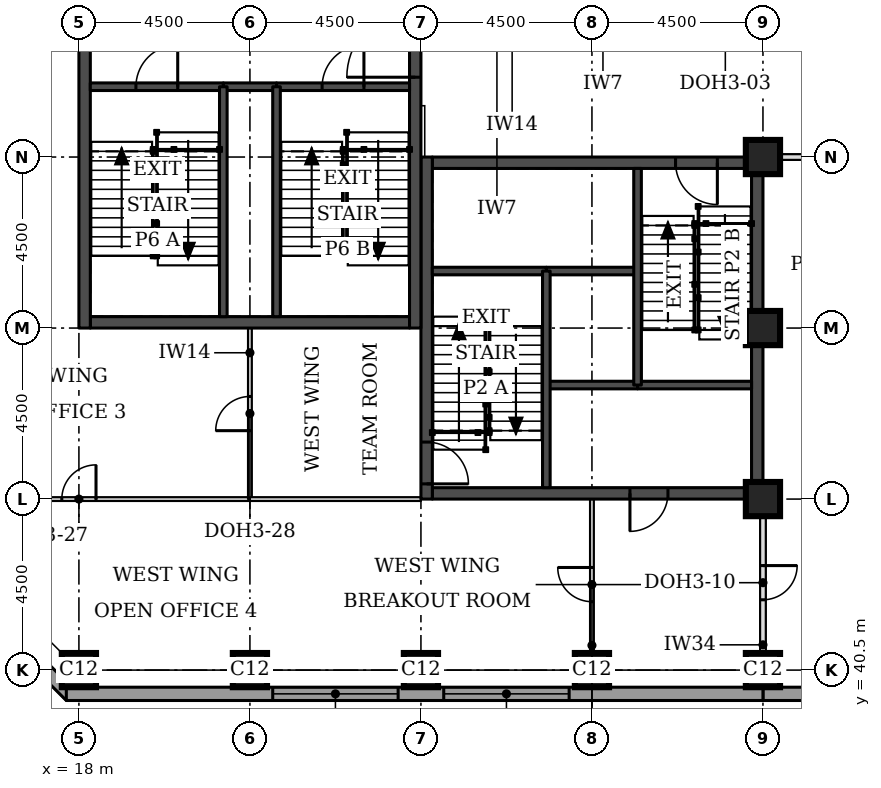
"""IFC4 building model, lengths in metres.
Left out: names, types, materials, properties, quantities, classifications, styles, units other than length and angle.
Written with IfcOpenShell. Run it as: python <this file> out.ifc"""

import sys

from ifc_helpers import new_model, si_unit, direction, frame, frame_2d, origin, origin_2d, place, context, subcontext, project, spatial, rectangle, extrude, element, fill, save


model = new_model("IFC4")
c1 = context("Model", 3, precision=1e-05, world=origin(), true_north=direction((0.0, 1.0)))
c2 = subcontext(c1, "Body", "Model", "MODEL_VIEW")
j1 = project(units=[si_unit("LENGTHUNIT", "METRE"), si_unit("PLANEANGLEUNIT", "RADIAN")], contexts=[c1])
p1 = place(None, origin())
s1 = spatial("IfcSite", under=j1, at=p1, CompositionType="ELEMENT")
p2 = place(p1, origin())
s2 = spatial("IfcBuilding", under=s1, at=p2, CompositionType="ELEMENT")
p3 = place(p2, frame((0.0, 0.0, 166.2)))
s3 = spatial("IfcBuildingStorey", under=s2, at=p3, CompositionType="ELEMENT", Elevation=166.2)
for number, where, z_axis, x_axis in (
    (1, (18.0, 40.5, 0.0), (0.0, 0.0, 1.0), (1.0, 0.0, 0.0)),
    (2, (22.5, 40.5, 0.0), (0.0, 0.0, 1.0), (1.0, 0.0, 0.0)),
    (3, (27.0, 40.5, 0.0), (0.0, 0.0, 1.0), (1.0, 0.0, 0.0)),
    (4, (31.5, 40.5, 0.0), (0.0, 0.0, 1.0), (1.0, 0.0, 0.0)),
    (5, (36.0, 40.5, 0.0), (0.0, 0.0, 1.0), (1.0, 0.0, 0.0)),
    (6, (36.0, 45.0, 0.0), (0.0, 0.0, 1.0), (1.0, 0.0, 0.0)),
    (7, (36.0, 49.5, 0.0), (0.0, 0.0, 1.0), (1.0, 0.0, 0.0)),
    (8, (36.0, 54.0, 0.0), (0.0, 0.0, 1.0), (1.0, 0.0, 0.0)),
):
    element("IfcColumn", number, at=place(p3, frame(where, z_axis=z_axis, x_axis=x_axis)), inside=s3, PredefinedType="COLUMN", context=c2, shape_type="SweptSolid", body=[
        extrude(rectangle(XDim=0.9, YDim=0.9, at=origin_2d()), origin(), (0.0, 0.0, 1.0), 3.7),
    ])
p4 = place(p3, frame((27.3, 45.15, 0.0), z_axis=(0.0, 0.0, 1.0), x_axis=(1.0, 0.0, 0.0)))
e9 = element("IfcWall", 9, at=p4, inside=s3, PredefinedType="SHEAR", context=c2, shape_type="SweptSolid", body=[
    extrude(rectangle(XDim=8.4, YDim=0.3, at=frame_2d((4.2, 0.0))), origin(), (0.0, 0.0, 1.0), 3.7),
])
p5 = place(p4, frame((5.2, 0.0, 0.0)))
e10 = element("IfcOpeningElement", 10, at=p5, cuts=e9, PredefinedType="OPENING", context=c2, shape_type="SweptSolid", body=[
    extrude(rectangle(XDim=1.0, YDim=2.1, at=frame_2d((0.5, 1.05))), frame((0.0, 0.16, 0.0), z_axis=(0.0, -1.0, 0.0), x_axis=(1.0, 0.0, 0.0)), (0.0, 0.0, 1.0), 0.32),
])
p6 = place(p3, frame((27.3, 53.85, 0.0), z_axis=(0.0, 0.0, 1.0), x_axis=(1.0, 0.0, 0.0)))
e11 = element("IfcWall", 11, at=p6, inside=s3, PredefinedType="SHEAR", context=c2, shape_type="SweptSolid", body=[
    extrude(rectangle(XDim=8.4, YDim=0.3, at=frame_2d((4.2, 0.0))), origin(), (0.0, 0.0, 1.0), 3.7),
])
p7 = place(p6, frame((6.4, 0.0, 0.0)))
e12 = element("IfcOpeningElement", 12, at=p7, cuts=e11, PredefinedType="OPENING", context=c2, shape_type="SweptSolid", body=[
    extrude(rectangle(XDim=1.1, YDim=2.1, at=frame_2d((0.55, 1.05))), frame((0.0, 0.16, 0.0), z_axis=(0.0, -1.0, 0.0), x_axis=(1.0, 0.0, 0.0)), (0.0, 0.0, 1.0), 0.32),
])
p8 = place(p3, frame((27.15, 45.0, 0.0), z_axis=(0.0, 0.0, 1.0), x_axis=(0.0, 1.0, 0.0)))
e13 = element("IfcWall", 13, at=p8, inside=s3, PredefinedType="SHEAR", context=c2, shape_type="SweptSolid", body=[
    extrude(rectangle(XDim=9.0, YDim=0.3, at=frame_2d((4.5, 0.0))), origin(), (0.0, 0.0, 1.0), 3.7),
])
p9 = place(p8, frame((0.4, 0.0, 0.0)))
e14 = element("IfcOpeningElement", 14, at=p9, cuts=e13, PredefinedType="OPENING", context=c2, shape_type="SweptSolid", body=[
    extrude(rectangle(XDim=1.1, YDim=2.1, at=frame_2d((0.55, 1.05))), frame((0.0, 0.16, 0.0), z_axis=(0.0, -1.0, 0.0), x_axis=(1.0, 0.0, 0.0)), (0.0, 0.0, 1.0), 0.32),
])
p10 = place(p3, frame((35.85, 45.0, 0.0), z_axis=(0.0, 0.0, 1.0), x_axis=(0.0, 1.0, 0.0)))
e15 = element("IfcWall", 15, at=p10, inside=s3, PredefinedType="SHEAR", context=c2, shape_type="SweptSolid", body=[
    extrude(rectangle(XDim=9.0, YDim=0.3, at=frame_2d((4.5, 0.0))), origin(), (0.0, 0.0, 1.0), 3.7),
])
p11 = place(p3, frame((18.3, 49.65, 0.0), z_axis=(0.0, 0.0, 1.0), x_axis=(1.0, 0.0, 0.0)))
e16 = element("IfcWall", 16, at=p11, inside=s3, PredefinedType="SHEAR", context=c2, shape_type="SweptSolid", body=[
    extrude(rectangle(XDim=8.4, YDim=0.3, at=frame_2d((4.2, 0.0))), origin(), (0.0, 0.0, 1.0), 3.7),
])
p12 = place(p3, frame((18.15, 49.5, 0.0), z_axis=(0.0, 0.0, 1.0), x_axis=(0.0, 1.0, 0.0)))
e17 = element("IfcWall", 17, at=p12, inside=s3, PredefinedType="SHEAR", context=c2, shape_type="SweptSolid", body=[
    extrude(rectangle(XDim=9.0, YDim=0.3, at=frame_2d((4.5, 0.0))), origin(), (0.0, 0.0, 1.0), 3.7),
])
p13 = place(p3, frame((26.85, 49.5, 0.0), z_axis=(0.0, 0.0, 1.0), x_axis=(0.0, 1.0, 0.0)))
e18 = element("IfcWall", 18, at=p13, inside=s3, PredefinedType="SHEAR", context=c2, shape_type="SweptSolid", body=[
    extrude(rectangle(XDim=9.0, YDim=0.3, at=frame_2d((4.5, 0.0))), origin(), (0.0, 0.0, 1.0), 3.7),
])
p14 = place(p13, frame((6.6, 0.0, 0.0)))
e19 = element("IfcOpeningElement", 19, at=p14, cuts=e18, PredefinedType="OPENING", context=c2, shape_type="SweptSolid", body=[
    extrude(rectangle(XDim=1.8, YDim=2.1, at=frame_2d((0.9, 1.05))), frame((0.0, 0.16, 0.0), z_axis=(0.0, -1.0, 0.0), x_axis=(1.0, 0.0, 0.0)), (0.0, 0.0, 1.0), 0.32),
])
p15 = place(p3, frame((36.0, 39.875, 0.0), z_axis=(0.0, 0.0, 1.0), x_axis=(1.0, 0.0, 0.0)))
e20 = element("IfcWall", 20, at=p15, inside=s3, PredefinedType="STANDARD", context=c2, shape_type="SweptSolid", body=[
    extrude(rectangle(XDim=36.331, YDim=0.35, at=frame_2d((18.166, 0.0))), origin(), (0.0, 0.0, 1.0), 3.525),
])
p16 = place(p15, frame((5.1, 0.0, 0.9)))
e21 = element("IfcOpeningElement", 21, at=p16, cuts=e20, PredefinedType="OPENING", context=c2, shape_type="SweptSolid", body=[
    extrude(rectangle(XDim=3.3, YDim=1.9, at=frame_2d((1.65, 0.95))), frame((0.0, 0.185, 0.0), z_axis=(0.0, -1.0, 0.0), x_axis=(1.0, 0.0, 0.0)), (0.0, 0.0, 1.0), 0.37),
])
p17 = place(p15, frame((9.6, 0.0, 0.9)))
e22 = element("IfcOpeningElement", 22, at=p17, cuts=e20, PredefinedType="OPENING", context=c2, shape_type="SweptSolid", body=[
    extrude(rectangle(XDim=3.3, YDim=1.9, at=frame_2d((1.65, 0.95))), frame((0.0, 0.185, 0.0), z_axis=(0.0, -1.0, 0.0), x_axis=(1.0, 0.0, 0.0)), (0.0, 0.0, 1.0), 0.37),
])
p18 = place(p15, frame((14.1, 0.0, 0.9)))
e23 = element("IfcOpeningElement", 23, at=p18, cuts=e20, PredefinedType="OPENING", context=c2, shape_type="SweptSolid", body=[
    extrude(rectangle(XDim=3.3, YDim=1.9, at=frame_2d((1.65, 0.95))), frame((0.0, 0.185, 0.0), z_axis=(0.0, -1.0, 0.0), x_axis=(1.0, 0.0, 0.0)), (0.0, 0.0, 1.0), 0.37),
])
p19 = place(p15, frame((18.6, 0.0, 0.9)))
e24 = element("IfcOpeningElement", 24, at=p19, cuts=e20, PredefinedType="OPENING", context=c2, shape_type="SweptSolid", body=[
    extrude(rectangle(XDim=3.3, YDim=1.9, at=frame_2d((1.65, 0.95))), frame((0.0, 0.185, 0.0), z_axis=(0.0, -1.0, 0.0), x_axis=(1.0, 0.0, 0.0)), (0.0, 0.0, 1.0), 0.37),
])
p20 = place(p15, frame((23.1, 0.0, 0.9)))
e25 = element("IfcOpeningElement", 25, at=p20, cuts=e20, PredefinedType="OPENING", context=c2, shape_type="SweptSolid", body=[
    extrude(rectangle(XDim=3.3, YDim=1.9, at=frame_2d((1.65, 0.95))), frame((0.0, 0.185, 0.0), z_axis=(0.0, -1.0, 0.0), x_axis=(1.0, 0.0, 0.0)), (0.0, 0.0, 1.0), 0.37),
])
p21 = place(p15, frame((27.6, 0.0, 0.9)))
e26 = element("IfcOpeningElement", 26, at=p21, cuts=e20, PredefinedType="OPENING", context=c2, shape_type="SweptSolid", body=[
    extrude(rectangle(XDim=3.3, YDim=1.9, at=frame_2d((1.65, 0.95))), frame((0.0, 0.185, 0.0), z_axis=(0.0, -1.0, 0.0), x_axis=(1.0, 0.0, 0.0)), (0.0, 0.0, 1.0), 0.37),
])
p22 = place(p3, frame((12.824, 44.792, 0.0), z_axis=(0.0, 0.0, 1.0), x_axis=(0.707106781187, -0.707106781187, 0.0)))
e27 = element("IfcWall", 27, at=p22, inside=s3, PredefinedType="STANDARD", context=c2, shape_type="SweptSolid", body=[
    extrude(rectangle(XDim=7.027, YDim=0.35, at=frame_2d((3.513, 0.0))), origin(), (0.0, 0.0, 1.0), 3.525),
])
p23 = place(p22, frame((1.863, 0.0, 0.9)))
e28 = element("IfcOpeningElement", 28, at=p23, cuts=e27, PredefinedType="OPENING", context=c2, shape_type="SweptSolid", body=[
    extrude(rectangle(XDim=3.3, YDim=1.9, at=frame_2d((1.65, 0.95))), frame((0.0, 0.185, 0.0), z_axis=(0.0, -1.0, 0.0), x_axis=(1.0, 0.0, 0.0)), (0.0, 0.0, 1.0), 0.37),
])
p24 = place(p3, frame((17.669, 39.875, 0.0), z_axis=(0.0, 0.0, 1.0), x_axis=(1.0, 0.0, 0.0)))
e29 = element("IfcWall", 29, at=p24, inside=s3, PredefinedType="STANDARD", context=c2, shape_type="SweptSolid", body=[
    extrude(rectangle(XDim=18.331, YDim=0.35, at=frame_2d((9.166, 0.0))), origin(), (0.0, 0.0, 1.0), 3.525),
])
p25 = place(p24, frame((5.431, 0.0, 0.9)))
e30 = element("IfcOpeningElement", 30, at=p25, cuts=e29, PredefinedType="OPENING", context=c2, shape_type="SweptSolid", body=[
    extrude(rectangle(XDim=3.3, YDim=1.9, at=frame_2d((1.65, 0.95))), frame((0.0, 0.185, 0.0), z_axis=(0.0, -1.0, 0.0), x_axis=(1.0, 0.0, 0.0)), (0.0, 0.0, 1.0), 0.37),
])
p26 = place(p24, frame((9.931, 0.0, 0.9)))
e31 = element("IfcOpeningElement", 31, at=p26, cuts=e29, PredefinedType="OPENING", context=c2, shape_type="SweptSolid", body=[
    extrude(rectangle(XDim=3.3, YDim=1.9, at=frame_2d((1.65, 0.95))), frame((0.0, 0.185, 0.0), z_axis=(0.0, -1.0, 0.0), x_axis=(1.0, 0.0, 0.0)), (0.0, 0.0, 1.0), 0.37),
])
p27 = place(p3, frame((36.45, 54.0, 0.0), z_axis=(0.0, 0.0, 1.0), x_axis=(1.0, 0.0, 0.0)))
e32 = element("IfcWall", 32, at=p27, inside=s3, PredefinedType="PARTITIONING", context=c2, shape_type="SweptSolid", body=[
    extrude(rectangle(XDim=5.625, YDim=0.15, at=frame_2d((2.812, 0.0))), origin(), (0.0, 0.0, 1.0), 3.55),
])
p28 = place(p3, frame((36.0, 40.95, 0.0), z_axis=(0.0, 0.0, 1.0), x_axis=(0.0, 1.0, 0.0)))
e33 = element("IfcWall", 33, at=p28, inside=s3, PredefinedType="PARTITIONING", context=c2, shape_type="SweptSolid", body=[
    extrude(rectangle(XDim=3.63, YDim=0.15, at=frame_2d((1.815, 0.0))), origin(), (0.0, 0.0, 1.0), 2.8),
])
p29 = place(p28, frame((1.4, 0.0, 0.0)))
e34 = element("IfcOpeningElement", 34, at=p29, cuts=e33, PredefinedType="OPENING", context=c2, shape_type="SweptSolid", body=[
    extrude(rectangle(XDim=0.9, YDim=2.1, at=frame_2d((0.45, 1.05))), frame((0.0, 0.085, 0.0), z_axis=(0.0, -1.0, 0.0), x_axis=(1.0, 0.0, 0.0)), (0.0, 0.0, 1.0), 0.17),
])
p30 = place(p3, frame((22.5, 45.0, 0.0), z_axis=(0.0, 0.0, 1.0), x_axis=(-1.0, 0.0, 0.0)))
e35 = element("IfcWall", 35, at=p30, inside=s3, PredefinedType="PARTITIONING", context=c2, shape_type="SweptSolid", body=[
    extrude(rectangle(XDim=9.0, YDim=0.1, at=frame_2d((4.5, 0.0))), origin(), (0.0, 0.0, 1.0), 2.55),
])
p31 = place(p30, frame((4.05, 0.0, 0.0)))
e36 = element("IfcOpeningElement", 36, at=p31, cuts=e35, PredefinedType="OPENING", context=c2, shape_type="SweptSolid", body=[
    extrude(rectangle(XDim=0.9, YDim=2.1, at=frame_2d((0.45, 1.05))), frame((0.0, 0.06, 0.0), z_axis=(0.0, -1.0, 0.0), x_axis=(1.0, 0.0, 0.0)), (0.0, 0.0, 1.0), 0.12),
])
p32 = place(p3, frame((22.5, 49.5, 0.0), z_axis=(0.0, 0.0, 1.0), x_axis=(0.0, -1.0, 0.0)))
e37 = element("IfcWall", 37, at=p32, inside=s3, PredefinedType="PARTITIONING", context=c2, shape_type="SweptSolid", body=[
    extrude(rectangle(XDim=4.5, YDim=0.1, at=frame_2d((2.25, 0.0))), origin(), (0.0, 0.0, 1.0), 3.55),
])
p33 = place(p32, frame((1.8, 0.0, 0.0)))
e38 = element("IfcOpeningElement", 38, at=p33, cuts=e37, PredefinedType="OPENING", context=c2, shape_type="SweptSolid", body=[
    extrude(rectangle(XDim=0.9, YDim=2.1, at=frame_2d((0.45, 1.05))), frame((0.0, 0.06, 0.0), z_axis=(0.0, -1.0, 0.0), x_axis=(1.0, 0.0, 0.0)), (0.0, 0.0, 1.0), 0.12),
])
p34 = place(p3, frame((22.5, 45.0, 0.0), z_axis=(0.0, 0.0, 1.0), x_axis=(1.0, 0.0, 0.0)))
e39 = element("IfcWall", 39, at=p34, inside=s3, PredefinedType="PARTITIONING", context=c2, shape_type="SweptSolid", body=[
    extrude(rectangle(XDim=4.5, YDim=0.1, at=frame_2d((2.25, 0.0))), origin(), (0.0, 0.0, 1.0), 2.55),
])
p35 = place(p3, frame((31.5, 45.0, 0.0), z_axis=(0.0, 0.0, 1.0), x_axis=(0.0, -1.0, 0.0)))
e40 = element("IfcWall", 40, at=p35, inside=s3, PredefinedType="PARTITIONING", context=c2, shape_type="SweptSolid", body=[
    extrude(rectangle(XDim=4.5, YDim=0.1, at=frame_2d((2.25, 0.0))), origin(), (0.0, 0.0, 1.0), 3.55),
])
p36 = place(p35, frame((1.8, 0.0, 0.0)))
e41 = element("IfcOpeningElement", 41, at=p36, cuts=e40, PredefinedType="OPENING", context=c2, shape_type="SweptSolid", body=[
    extrude(rectangle(XDim=0.9, YDim=2.1, at=frame_2d((0.45, 1.05))), frame((0.0, 0.06, 0.0), z_axis=(0.0, -1.0, 0.0), x_axis=(1.0, 0.0, 0.0)), (0.0, 0.0, 1.0), 0.12),
])
p37 = place(p3, frame((30.3, 48.0, 0.0), z_axis=(0.0, 0.0, 1.0), x_axis=(1.0, 0.0, 0.0)))
e42 = element("IfcWall", 42, at=p37, inside=s3, PredefinedType="SOLIDWALL", context=c2, shape_type="SweptSolid", body=[
    extrude(rectangle(XDim=2.4, YDim=0.2, at=frame_2d((1.2, 0.0))), origin(), (0.0, 0.0, 1.0), 3.55),
])
p38 = place(p3, frame((32.7, 48.0, 0.0), z_axis=(0.0, 0.0, 1.0), x_axis=(1.0, 0.0, 0.0)))
e43 = element("IfcWall", 43, at=p38, inside=s3, PredefinedType="SOLIDWALL", context=c2, shape_type="SweptSolid", body=[
    extrude(rectangle(XDim=3.0, YDim=0.2, at=frame_2d((1.5, 0.0))), origin(), (0.0, 0.0, 1.0), 3.55),
])
p39 = place(p3, frame((30.3, 51.0, 0.0), z_axis=(0.0, 0.0, 1.0), x_axis=(1.0, 0.0, 0.0)))
e44 = element("IfcWall", 44, at=p39, inside=s3, PredefinedType="SOLIDWALL", context=c2, shape_type="SweptSolid", body=[
    extrude(rectangle(XDim=2.4, YDim=0.2, at=frame_2d((1.2, 0.0))), origin(), (0.0, 0.0, 1.0), 3.7),
])
p40 = place(p3, frame((27.3, 51.0, 0.0), z_axis=(0.0, 0.0, 1.0), x_axis=(1.0, 0.0, 0.0)))
e45 = element("IfcWall", 45, at=p40, inside=s3, PredefinedType="SOLIDWALL", context=c2, shape_type="SweptSolid", body=[
    extrude(rectangle(XDim=3.0, YDim=0.2, at=frame_2d((1.5, 0.0))), origin(), (0.0, 0.0, 1.0), 3.55),
])
for number, where, z_axis, x_axis in (
    (46, (30.3, 45.3, 0.0), (0.0, 0.0, 1.0), (0.0, 1.0, 0.0)),
    (47, (32.7, 48.0, 0.0), (0.0, 0.0, 1.0), (0.0, 1.0, 0.0)),
):
    element("IfcWall", number, at=place(p3, frame(where, z_axis=z_axis, x_axis=x_axis)), inside=s3, PredefinedType="SOLIDWALL", context=c2, shape_type="SweptSolid", body=[
        extrude(rectangle(XDim=5.7, YDim=0.2, at=frame_2d((2.85, 0.0))), origin(), (0.0, 0.0, 1.0), 3.55),
    ])
p41 = place(p3, frame((21.8, 55.85, 0.0), z_axis=(0.0, 0.0, 1.0), x_axis=(1.0, 0.0, 0.0)))
e48 = element("IfcWall", 48, at=p41, inside=s3, PredefinedType="SOLIDWALL", context=c2, shape_type="SweptSolid", body=[
    extrude(rectangle(XDim=1.4, YDim=0.2, at=frame_2d((0.7, 0.0))), origin(), (0.0, 0.0, 1.0), 3.55),
])
p42 = place(p3, frame((18.3, 55.85, 0.0), z_axis=(0.0, 0.0, 1.0), x_axis=(1.0, 0.0, 0.0)))
e49 = element("IfcWall", 49, at=p42, inside=s3, PredefinedType="SOLIDWALL", context=c2, shape_type="SweptSolid", body=[
    extrude(rectangle(XDim=3.5, YDim=0.2, at=frame_2d((1.75, 0.0))), origin(), (0.0, 0.0, 1.0), 3.55),
])
p43 = place(p42, frame((1.2, 0.0, 0.0)))
e50 = element("IfcOpeningElement", 50, at=p43, cuts=e49, PredefinedType="OPENING", context=c2, shape_type="SweptSolid", body=[
    extrude(rectangle(XDim=1.1, YDim=2.1, at=frame_2d((0.55, 1.05))), frame((0.0, 0.11, 0.0), z_axis=(0.0, -1.0, 0.0), x_axis=(1.0, 0.0, 0.0)), (0.0, 0.0, 1.0), 0.22),
])
p44 = place(p3, frame((23.2, 55.85, 0.0), z_axis=(0.0, 0.0, 1.0), x_axis=(1.0, 0.0, 0.0)))
e51 = element("IfcWall", 51, at=p44, inside=s3, PredefinedType="SOLIDWALL", context=c2, shape_type="SweptSolid", body=[
    extrude(rectangle(XDim=3.5, YDim=0.2, at=frame_2d((1.75, 0.0))), origin(), (0.0, 0.0, 1.0), 3.55),
])
p45 = place(p44, frame((1.2, 0.0, 0.0)))
e52 = element("IfcOpeningElement", 52, at=p45, cuts=e51, PredefinedType="OPENING", context=c2, shape_type="SweptSolid", body=[
    extrude(rectangle(XDim=1.1, YDim=2.1, at=frame_2d((0.55, 1.05))), frame((0.0, 0.11, 0.0), z_axis=(0.0, -1.0, 0.0), x_axis=(1.0, 0.0, 0.0)), (0.0, 0.0, 1.0), 0.22),
])
for number, where, z_axis, x_axis in (
    (53, (21.8, 49.8, 0.0), (0.0, 0.0, 1.0), (0.0, 1.0, 0.0)),
    (54, (23.2, 49.8, 0.0), (0.0, 0.0, 1.0), (0.0, 1.0, 0.0)),
):
    element("IfcWall", number, at=place(p3, frame(where, z_axis=z_axis, x_axis=x_axis)), inside=s3, PredefinedType="SOLIDWALL", context=c2, shape_type="SweptSolid", body=[
        extrude(rectangle(XDim=6.05, YDim=0.2, at=frame_2d((3.025, 0.0))), origin(), (0.0, 0.0, 1.0), 3.55),
    ])
p46 = place(p25, origin())
e55 = element("IfcWindow", 55, at=p46, inside=s3, PartitioningType="SINGLE_PANEL", PredefinedType="WINDOW", context=c2, shape_type="SweptSolid", body=[
    extrude(rectangle(XDim=3.3, YDim=1.9, at=frame_2d((1.65, 0.95))), frame((0.0, 0.085, 0.0), z_axis=(0.0, -1.0, 0.0), x_axis=(1.0, 0.0, 0.0)), (0.0, 0.0, 1.0), 0.06),
])
fill(e30, e55)
p47 = place(p26, origin())
e56 = element("IfcWindow", 56, at=p47, inside=s3, PartitioningType="SINGLE_PANEL", PredefinedType="WINDOW", context=c2, shape_type="SweptSolid", body=[
    extrude(rectangle(XDim=3.3, YDim=1.9, at=frame_2d((1.65, 0.95))), frame((0.0, 0.085, 0.0), z_axis=(0.0, -1.0, 0.0), x_axis=(1.0, 0.0, 0.0)), (0.0, 0.0, 1.0), 0.06),
])
fill(e31, e56)
p48 = place(p29, frame((0.9, 0.0, 0.0), z_axis=(0.0, 0.0, 1.0), x_axis=(-1.0, 0.0, 0.0)))
e57 = element("IfcDoor", 57, at=p48, inside=s3, OperationType="SINGLE_SWING_LEFT", PredefinedType="DOOR", context=c2, shape_type="SweptSolid", body=[
    extrude(rectangle(XDim=0.9, YDim=2.1, at=frame_2d((0.45, 1.05))), frame((0.0, 0.025, 0.0), z_axis=(0.0, -1.0, 0.0), x_axis=(1.0, 0.0, 0.0)), (0.0, 0.0, 1.0), 0.05),
])
fill(e34, e57)
p49 = place(p31, frame((0.9, 0.0, 0.0), z_axis=(0.0, 0.0, 1.0), x_axis=(-1.0, 0.0, 0.0)))
e58 = element("IfcDoor", 58, at=p49, inside=s3, OperationType="SINGLE_SWING_RIGHT", PredefinedType="DOOR", context=c2, shape_type="SweptSolid", body=[
    extrude(rectangle(XDim=0.9, YDim=2.1, at=frame_2d((0.45, 1.05))), frame((0.0, 0.025, 0.0), z_axis=(0.0, -1.0, 0.0), x_axis=(1.0, 0.0, 0.0)), (0.0, 0.0, 1.0), 0.05),
])
fill(e36, e58)
p50 = place(p33, frame((0.9, 0.0, 0.0), z_axis=(0.0, 0.0, 1.0), x_axis=(-1.0, 0.0, 0.0)))
e59 = element("IfcDoor", 59, at=p50, inside=s3, OperationType="SINGLE_SWING_LEFT", PredefinedType="DOOR", context=c2, shape_type="SweptSolid", body=[
    extrude(rectangle(XDim=0.9, YDim=2.1, at=frame_2d((0.45, 1.05))), frame((0.0, 0.025, 0.0), z_axis=(0.0, -1.0, 0.0), x_axis=(1.0, 0.0, 0.0)), (0.0, 0.0, 1.0), 0.05),
])
fill(e38, e59)
p51 = place(p36, frame((0.9, 0.0, 0.0), z_axis=(0.0, 0.0, 1.0), x_axis=(-1.0, 0.0, 0.0)))
e60 = element("IfcDoor", 60, at=p51, inside=s3, OperationType="SINGLE_SWING_RIGHT", PredefinedType="DOOR", context=c2, shape_type="SweptSolid", body=[
    extrude(rectangle(XDim=0.9, YDim=2.1, at=frame_2d((0.45, 1.05))), frame((0.0, 0.025, 0.0), z_axis=(0.0, -1.0, 0.0), x_axis=(1.0, 0.0, 0.0)), (0.0, 0.0, 1.0), 0.05),
])
fill(e41, e60)
p52 = place(p9, frame((1.1, 0.0, 0.0), z_axis=(0.0, 0.0, 1.0), x_axis=(-1.0, 0.0, 0.0)))
e61 = element("IfcDoor", 61, at=p52, inside=s3, OperationType="SINGLE_SWING_RIGHT", PredefinedType="DOOR", context=c2, shape_type="SweptSolid", body=[
    extrude(rectangle(XDim=1.1, YDim=2.1, at=frame_2d((0.55, 1.05))), frame((0.0, 0.025, 0.0), z_axis=(0.0, -1.0, 0.0), x_axis=(1.0, 0.0, 0.0)), (0.0, 0.0, 1.0), 0.05),
])
fill(e14, e61)
p53 = place(p7, frame((1.1, 0.0, 0.0), z_axis=(0.0, 0.0, 1.0), x_axis=(-1.0, 0.0, 0.0)))
e62 = element("IfcDoor", 62, at=p53, inside=s3, OperationType="SINGLE_SWING_LEFT", PredefinedType="DOOR", context=c2, shape_type="SweptSolid", body=[
    extrude(rectangle(XDim=1.1, YDim=2.1, at=frame_2d((0.55, 1.05))), frame((0.0, 0.025, 0.0), z_axis=(0.0, -1.0, 0.0), x_axis=(1.0, 0.0, 0.0)), (0.0, 0.0, 1.0), 0.05),
])
fill(e12, e62)
p54 = place(p5, frame((1.0, 0.0, 0.0), z_axis=(0.0, 0.0, 1.0), x_axis=(-1.0, 0.0, 0.0)))
e63 = element("IfcDoor", 63, at=p54, inside=s3, OperationType="SINGLE_SWING_RIGHT", PredefinedType="DOOR", context=c2, shape_type="SweptSolid", body=[
    extrude(rectangle(XDim=1.0, YDim=2.1, at=frame_2d((0.5, 1.05))), frame((0.0, 0.025, 0.0), z_axis=(0.0, -1.0, 0.0), x_axis=(1.0, 0.0, 0.0)), (0.0, 0.0, 1.0), 0.05),
])
fill(e10, e63)
p55 = place(p43, origin())
e64 = element("IfcDoor", 64, at=p55, inside=s3, OperationType="SINGLE_SWING_RIGHT", PredefinedType="DOOR", context=c2, shape_type="SweptSolid", body=[
    extrude(rectangle(XDim=1.1, YDim=2.1, at=frame_2d((0.55, 1.05))), frame((0.0, 0.025, 0.0), z_axis=(0.0, -1.0, 0.0), x_axis=(1.0, 0.0, 0.0)), (0.0, 0.0, 1.0), 0.05),
])
fill(e50, e64)
p56 = place(p45, origin())
e65 = element("IfcDoor", 65, at=p56, inside=s3, OperationType="SINGLE_SWING_RIGHT", PredefinedType="DOOR", context=c2, shape_type="SweptSolid", body=[
    extrude(rectangle(XDim=1.1, YDim=2.1, at=frame_2d((0.55, 1.05))), frame((0.0, 0.025, 0.0), z_axis=(0.0, -1.0, 0.0), x_axis=(1.0, 0.0, 0.0)), (0.0, 0.0, 1.0), 0.05),
])
fill(e52, e65)
p57 = place(p14, origin())
e66 = element("IfcDoor", 66, at=p57, inside=s3, OperationType="SINGLE_SWING_LEFT", PredefinedType="DOOR", context=c2, shape_type="SweptSolid", body=[
    extrude(rectangle(XDim=1.8, YDim=2.1, at=frame_2d((0.9, 1.05))), frame((0.0, 0.025, 0.0), z_axis=(0.0, -1.0, 0.0), x_axis=(1.0, 0.0, 0.0)), (0.0, 0.0, 1.0), 0.05),
])
fill(e19, e66)
save(model, sys.argv[1])
